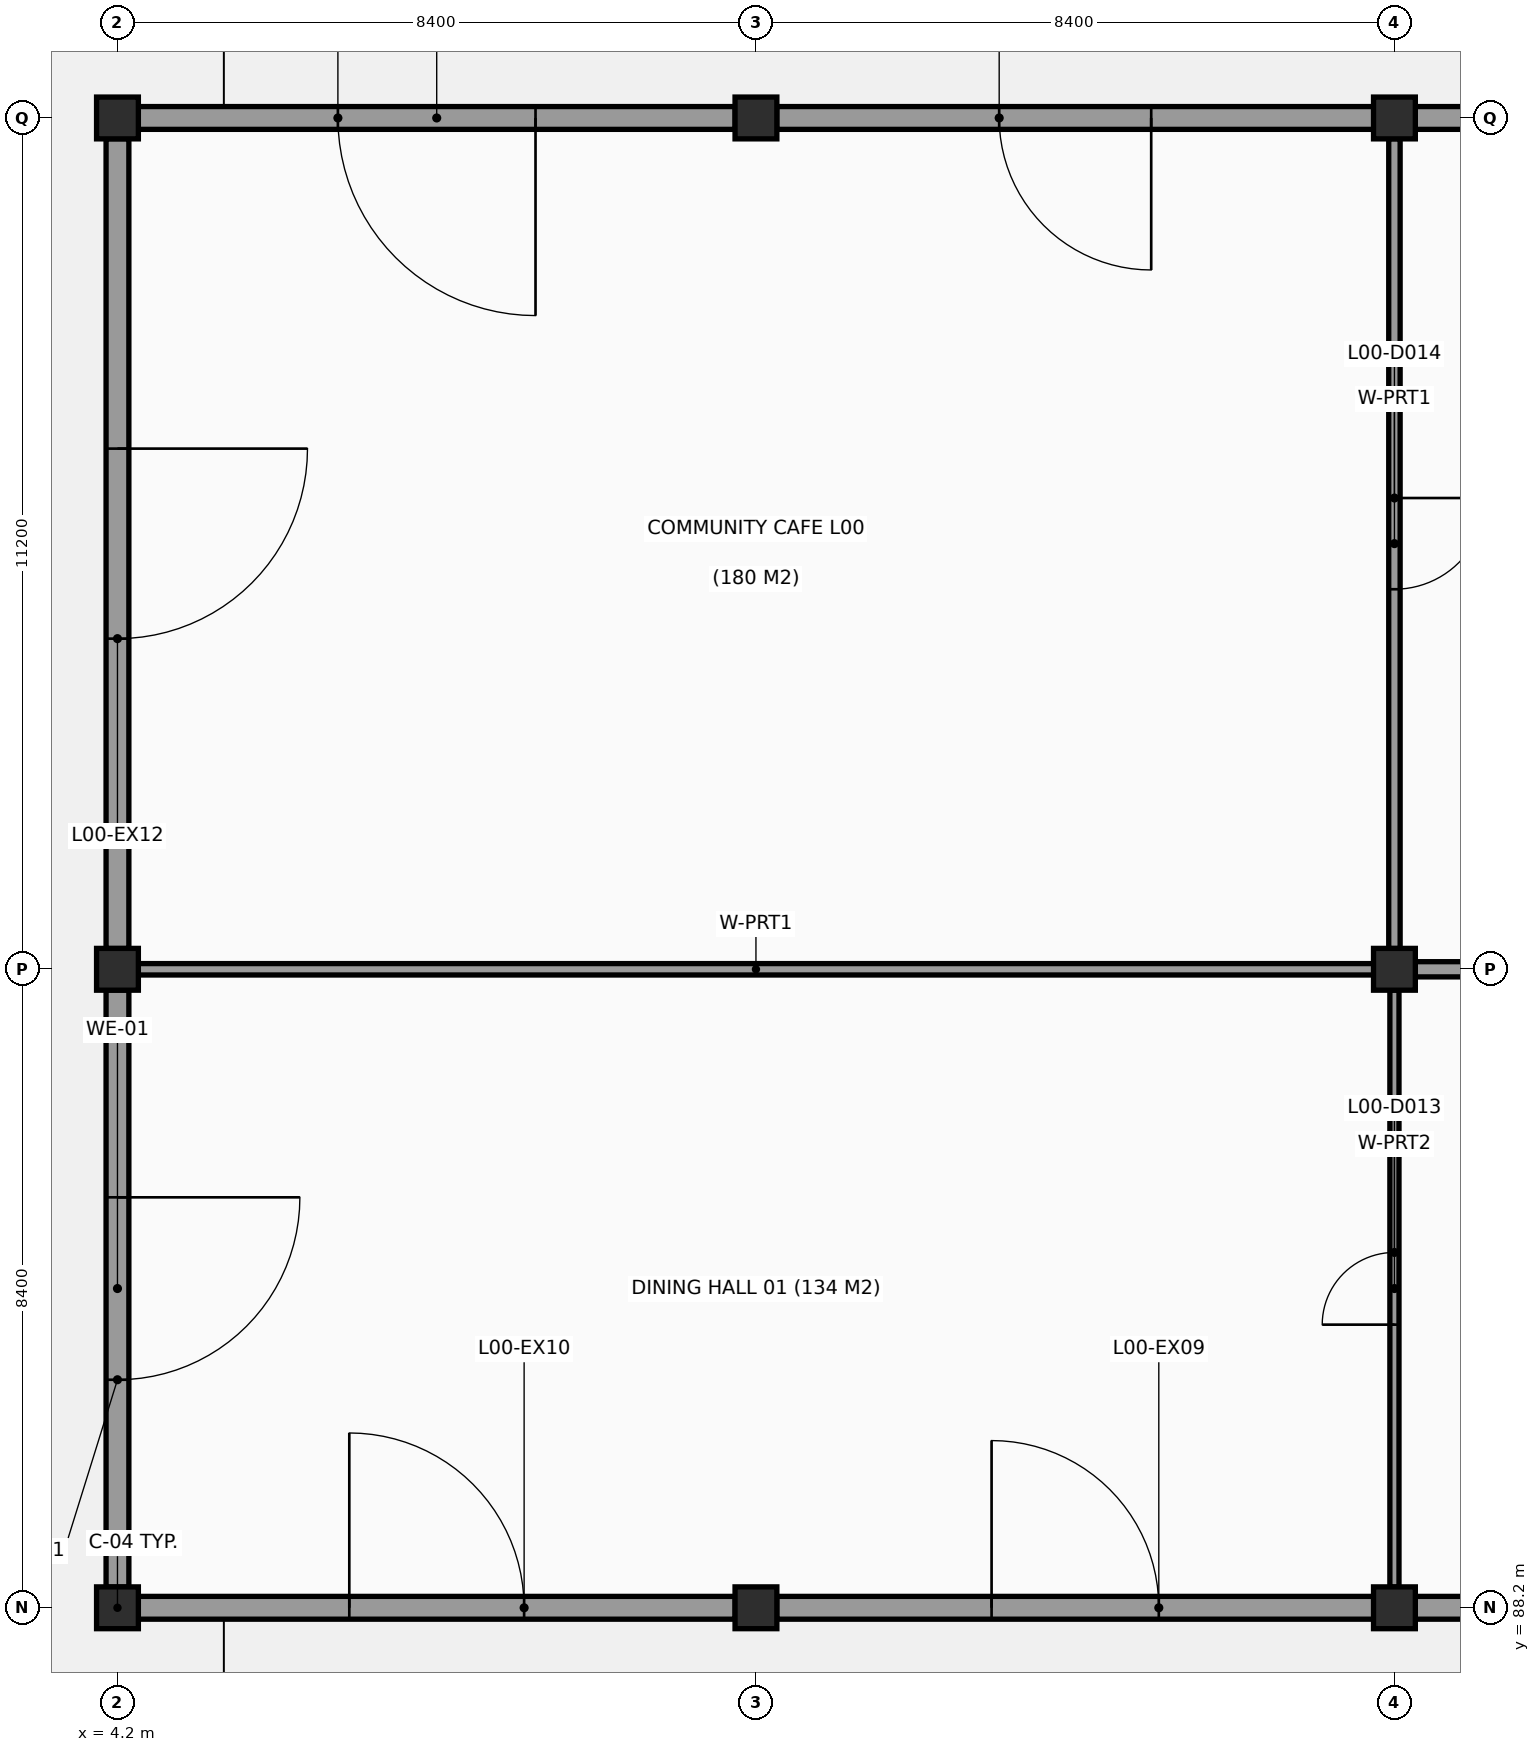
"""IFC4 building model, lengths in metres.
Left out: names, types, materials, properties, quantities, classifications, styles, units other than length and angle.
Written with IfcOpenShell. Run it as: python <this file> out.ifc"""

import sys

from ifc_helpers import new_model, si_unit, direction, frame, frame_2d, origin, origin_2d, place, context, subcontext, project, spatial, rectangle, extrude, element, fill, save


model = new_model("IFC4")
c1 = context("Model", 3, precision=1e-05, world=origin(), true_north=direction((0.0, 1.0)))
c2 = subcontext(c1, "Body", "Model", "MODEL_VIEW")
j1 = project(units=[si_unit("LENGTHUNIT", "METRE"), si_unit("PLANEANGLEUNIT", "RADIAN")], contexts=[c1])
p1 = place(None, origin())
s1 = spatial("IfcSite", under=j1, at=p1, CompositionType="ELEMENT")
p2 = place(p1, origin())
s2 = spatial("IfcBuilding", under=s1, at=p2, CompositionType="ELEMENT")
p3 = place(p2, origin())
s3 = spatial("IfcBuildingStorey", under=s2, at=p3, CompositionType="ELEMENT", Elevation=0.0)
for number, where, z_axis, x_axis in (
    (1, (4.2, 88.2, -0.4), (0.0, 0.0, 1.0), (1.0, 0.0, 0.0)),
    (2, (4.2, 96.6, -0.4), (0.0, 0.0, 1.0), (1.0, 0.0, 0.0)),
    (3, (4.2, 107.8, -0.4), (0.0, 0.0, 1.0), (1.0, 0.0, 0.0)),
    (4, (12.6, 88.2, -0.4), (0.0, 0.0, 1.0), (1.0, 0.0, 0.0)),
    (5, (12.6, 107.8, -0.4), (0.0, 0.0, 1.0), (1.0, 0.0, 0.0)),
    (6, (21.0, 88.2, -0.4), (0.0, 0.0, 1.0), (1.0, 0.0, 0.0)),
    (7, (21.0, 96.6, -0.4), (0.0, 0.0, 1.0), (1.0, 0.0, 0.0)),
    (8, (21.0, 107.8, -0.4), (0.0, 0.0, 1.0), (1.0, 0.0, 0.0)),
):
    element("IfcColumn", number, at=place(p3, frame(where, z_axis=z_axis, x_axis=x_axis)), inside=s3, PredefinedType="COLUMN", context=c2, shape_type="SweptSolid", body=[
        extrude(rectangle(XDim=0.55, YDim=0.55, at=origin_2d()), origin(), (0.0, 0.0, 1.0), 4.6),
    ])
p4 = place(p3, frame((29.152, 88.2, 0.0), z_axis=(0.0, 0.0, 1.0), x_axis=(-1.0, 0.0, 0.0)))
e9 = element("IfcWall", 9, at=p4, inside=s3, PredefinedType="SOLIDWALL", context=c2, shape_type="SweptSolid", body=[
    extrude(rectangle(XDim=7.879, YDim=0.3, at=frame_2d((3.939, 0.0))), origin(), (0.0, 0.0, 1.0), 3.22),
])
p5 = place(p4, frame((2.889, 0.0, 0.0)))
e10 = element("IfcOpeningElement", 10, at=p5, cuts=e9, PredefinedType="OPENING", context=c2, shape_type="SweptSolid", body=[
    extrude(rectangle(XDim=2.1, YDim=2.3, at=frame_2d((1.05, 1.15))), frame((0.0, 0.16, 0.0), z_axis=(0.0, -1.0, 0.0), x_axis=(1.0, 0.0, 0.0)), (0.0, 0.0, 1.0), 0.32),
])
p6 = place(p3, frame((20.727, 88.2, 0.0), z_axis=(0.0, 0.0, 1.0), x_axis=(-1.0, 0.0, 0.0)))
e11 = element("IfcWall", 11, at=p6, inside=s3, PredefinedType="SOLIDWALL", context=c2, shape_type="SweptSolid", body=[
    extrude(rectangle(XDim=7.854, YDim=0.3, at=frame_2d((3.927, 0.0))), origin(), (0.0, 0.0, 1.0), 3.22),
])
p7 = place(p6, frame((2.827, 0.0, 0.0)))
e12 = element("IfcOpeningElement", 12, at=p7, cuts=e11, PredefinedType="OPENING", context=c2, shape_type="SweptSolid", body=[
    extrude(rectangle(XDim=2.2, YDim=2.35, at=frame_2d((1.1, 1.175))), frame((0.0, 0.16, 0.0), z_axis=(0.0, -1.0, 0.0), x_axis=(1.0, 0.0, 0.0)), (0.0, 0.0, 1.0), 0.32),
])
p8 = place(p3, frame((12.327, 88.2, 0.0), z_axis=(0.0, 0.0, 1.0), x_axis=(-1.0, 0.0, 0.0)))
e13 = element("IfcWall", 13, at=p8, inside=s3, PredefinedType="SOLIDWALL", context=c2, shape_type="SweptSolid", body=[
    extrude(rectangle(XDim=7.854, YDim=0.3, at=frame_2d((3.927, 0.0))), origin(), (0.0, 0.0, 1.0), 3.22),
])
p9 = place(p8, frame((2.777, 0.0, 0.0)))
e14 = element("IfcOpeningElement", 14, at=p9, cuts=e13, PredefinedType="OPENING", context=c2, shape_type="SweptSolid", body=[
    extrude(rectangle(XDim=2.3, YDim=2.4, at=frame_2d((1.15, 1.2))), frame((0.0, 0.16, 0.0), z_axis=(0.0, -1.0, 0.0), x_axis=(1.0, 0.0, 0.0)), (0.0, 0.0, 1.0), 0.32),
])
p10 = place(p3, frame((4.2, 88.473, 0.0), z_axis=(0.0, 0.0, 1.0), x_axis=(0.0, 1.0, 0.0)))
e15 = element("IfcWall", 15, at=p10, inside=s3, PredefinedType="SOLIDWALL", context=c2, shape_type="SweptSolid", body=[
    extrude(rectangle(XDim=7.854, YDim=0.3, at=frame_2d((3.927, 0.0))), origin(), (0.0, 0.0, 1.0), 3.22),
])
p11 = place(p10, frame((2.727, 0.0, 0.0)))
e16 = element("IfcOpeningElement", 16, at=p11, cuts=e15, PredefinedType="OPENING", context=c2, shape_type="SweptSolid", body=[
    extrude(rectangle(XDim=2.4, YDim=2.45, at=frame_2d((1.2, 1.225))), frame((0.0, 0.16, 0.0), z_axis=(0.0, -1.0, 0.0), x_axis=(1.0, 0.0, 0.0)), (0.0, 0.0, 1.0), 0.32),
])
p12 = place(p3, frame((4.2, 96.873, 0.0), z_axis=(0.0, 0.0, 1.0), x_axis=(0.0, 1.0, 0.0)))
e17 = element("IfcWall", 17, at=p12, inside=s3, PredefinedType="SOLIDWALL", context=c2, shape_type="SweptSolid", body=[
    extrude(rectangle(XDim=10.654, YDim=0.3, at=frame_2d((5.327, 0.0))), origin(), (0.0, 0.0, 1.0), 3.22),
])
p13 = place(p12, frame((4.077, 0.0, 0.0)))
e18 = element("IfcOpeningElement", 18, at=p13, cuts=e17, PredefinedType="OPENING", context=c2, shape_type="SweptSolid", body=[
    extrude(rectangle(XDim=2.5, YDim=2.5, at=frame_2d((1.25, 1.25))), frame((0.0, 0.16, 0.0), z_axis=(0.0, -1.0, 0.0), x_axis=(1.0, 0.0, 0.0)), (0.0, 0.0, 1.0), 0.32),
])
p14 = place(p3, frame((4.473, 107.8, 0.0), z_axis=(0.0, 0.0, 1.0), x_axis=(1.0, 0.0, 0.0)))
e19 = element("IfcWall", 19, at=p14, inside=s3, PredefinedType="SOLIDWALL", context=c2, shape_type="SweptSolid", body=[
    extrude(rectangle(XDim=7.854, YDim=0.3, at=frame_2d((3.927, 0.0))), origin(), (0.0, 0.0, 1.0), 3.22),
])
p15 = place(p14, frame((2.627, 0.0, 0.0)))
e20 = element("IfcOpeningElement", 20, at=p15, cuts=e19, PredefinedType="OPENING", context=c2, shape_type="SweptSolid", body=[
    extrude(rectangle(XDim=2.6, YDim=2.55, at=frame_2d((1.3, 1.275))), frame((0.0, 0.16, 0.0), z_axis=(0.0, -1.0, 0.0), x_axis=(1.0, 0.0, 0.0)), (0.0, 0.0, 1.0), 0.32),
])
p16 = place(p3, frame((12.873, 107.8, 0.0), z_axis=(0.0, 0.0, 1.0), x_axis=(1.0, 0.0, 0.0)))
e21 = element("IfcWall", 21, at=p16, inside=s3, PredefinedType="SOLIDWALL", context=c2, shape_type="SweptSolid", body=[
    extrude(rectangle(XDim=7.854, YDim=0.3, at=frame_2d((3.927, 0.0))), origin(), (0.0, 0.0, 1.0), 3.22),
])
p17 = place(p16, frame((2.927, 0.0, 0.0)))
e22 = element("IfcOpeningElement", 22, at=p17, cuts=e21, PredefinedType="OPENING", context=c2, shape_type="SweptSolid", body=[
    extrude(rectangle(XDim=2.0, YDim=2.25, at=frame_2d((1.0, 1.125))), frame((0.0, 0.16, 0.0), z_axis=(0.0, -1.0, 0.0), x_axis=(1.0, 0.0, 0.0)), (0.0, 0.0, 1.0), 0.32),
])
p18 = place(p3, frame((21.273, 107.8, 0.0), z_axis=(0.0, 0.0, 1.0), x_axis=(1.0, 0.0, 0.0)))
e23 = element("IfcWall", 23, at=p18, inside=s3, PredefinedType="SOLIDWALL", context=c2, shape_type="SweptSolid", body=[
    extrude(rectangle(XDim=7.879, YDim=0.3, at=frame_2d((3.939, 0.0))), origin(), (0.0, 0.0, 1.0), 3.22),
])
p19 = place(p18, frame((2.889, 0.0, 0.0)))
e24 = element("IfcOpeningElement", 24, at=p19, cuts=e23, PredefinedType="OPENING", context=c2, shape_type="SweptSolid", body=[
    extrude(rectangle(XDim=2.1, YDim=2.3, at=frame_2d((1.05, 1.15))), frame((0.0, 0.16, 0.0), z_axis=(0.0, -1.0, 0.0), x_axis=(1.0, 0.0, 0.0)), (0.0, 0.0, 1.0), 0.32),
])
p20 = place(p3, frame((4.473, 96.6, 0.0), z_axis=(0.0, 0.0, 1.0), x_axis=(1.0, 0.0, 0.0)))
e25 = element("IfcWall", 25, at=p20, inside=s3, PredefinedType="PARTITIONING", context=c2, shape_type="SweptSolid", body=[
    extrude(rectangle(XDim=16.254, YDim=0.15, at=frame_2d((8.127, 0.0))), origin(), (0.0, 0.0, 1.0), 3.92),
])
p21 = place(p3, frame((21.0, 96.327, 0.0), z_axis=(0.0, 0.0, 1.0), x_axis=(0.0, -1.0, 0.0)))
e26 = element("IfcWall", 26, at=p21, inside=s3, PredefinedType="PARTITIONING", context=c2, shape_type="SweptSolid", body=[
    extrude(rectangle(XDim=7.854, YDim=0.12, at=frame_2d((3.927, 0.0))), origin(), (0.0, 0.0, 1.0), 3.22),
])
p22 = place(p21, frame((3.452, 0.0, 0.0)))
e27 = element("IfcOpeningElement", 27, at=p22, cuts=e26, PredefinedType="OPENING", context=c2, shape_type="SweptSolid", body=[
    extrude(rectangle(XDim=0.95, YDim=2.1, at=frame_2d((0.475, 1.05))), frame((0.0, 0.07, 0.0), z_axis=(0.0, -1.0, 0.0), x_axis=(1.0, 0.0, 0.0)), (0.0, 0.0, 1.0), 0.14),
])
p23 = place(p3, frame((21.0, 107.527, 0.0), z_axis=(0.0, 0.0, 1.0), x_axis=(0.0, -1.0, 0.0)))
e28 = element("IfcWall", 28, at=p23, inside=s3, PredefinedType="PARTITIONING", context=c2, shape_type="SweptSolid", body=[
    extrude(rectangle(XDim=10.654, YDim=0.15, at=frame_2d((5.327, 0.0))), origin(), (0.0, 0.0, 1.0), 3.22),
])
p24 = place(p23, frame((4.727, 0.0, 0.0)))
e29 = element("IfcOpeningElement", 29, at=p24, cuts=e28, PredefinedType="OPENING", context=c2, shape_type="SweptSolid", body=[
    extrude(rectangle(XDim=1.2, YDim=2.15, at=frame_2d((0.6, 1.075))), frame((0.0, 0.085, 0.0), z_axis=(0.0, -1.0, 0.0), x_axis=(1.0, 0.0, 0.0)), (0.0, 0.0, 1.0), 0.17),
])
p25 = place(p3, frame((37.527, 96.6, 0.0), z_axis=(0.0, 0.0, 1.0), x_axis=(-1.0, 0.0, 0.0)))
e30 = element("IfcWall", 30, at=p25, inside=s3, PredefinedType="PARTITIONING", context=c2, shape_type="SweptSolid", body=[
    extrude(rectangle(XDim=16.254, YDim=0.2, at=frame_2d((8.127, 0.0))), origin(), (0.0, 0.0, 1.0), 3.53),
])
p26 = place(p25, frame((9.202, 0.0, 0.0)))
e31 = element("IfcOpeningElement", 31, at=p26, cuts=e30, PredefinedType="OPENING", context=c2, shape_type="SweptSolid", body=[
    extrude(rectangle(XDim=1.55, YDim=2.2, at=frame_2d((0.775, 1.1))), frame((0.0, 0.11, 0.0), z_axis=(0.0, -1.0, 0.0), x_axis=(1.0, 0.0, 0.0)), (0.0, 0.0, 1.0), 0.22),
])
p27 = place(p7, origin())
e32 = element("IfcDoor", 32, at=p27, inside=s3, OperationType="DOUBLE_DOOR_SINGLE_SWING", PredefinedType="DOOR", context=c2, shape_type="SweptSolid", body=[
    extrude(rectangle(XDim=2.2, YDim=2.35, at=frame_2d((1.1, 1.175))), frame((0.0, 0.025, 0.0), z_axis=(0.0, -1.0, 0.0), x_axis=(1.0, 0.0, 0.0)), (0.0, 0.0, 1.0), 0.05),
])
fill(e12, e32)
p28 = place(p9, origin())
e33 = element("IfcDoor", 33, at=p28, inside=s3, OperationType="DOUBLE_DOOR_SINGLE_SWING", PredefinedType="DOOR", context=c2, shape_type="SweptSolid", body=[
    extrude(rectangle(XDim=2.3, YDim=2.4, at=frame_2d((1.15, 1.2))), frame((0.0, 0.025, 0.0), z_axis=(0.0, -1.0, 0.0), x_axis=(1.0, 0.0, 0.0)), (0.0, 0.0, 1.0), 0.05),
])
fill(e14, e33)
p29 = place(p11, origin())
e34 = element("IfcDoor", 34, at=p29, inside=s3, OperationType="DOUBLE_DOOR_SINGLE_SWING", PredefinedType="DOOR", context=c2, shape_type="SweptSolid", body=[
    extrude(rectangle(XDim=2.4, YDim=2.45, at=frame_2d((1.2, 1.225))), frame((0.0, 0.025, 0.0), z_axis=(0.0, -1.0, 0.0), x_axis=(1.0, 0.0, 0.0)), (0.0, 0.0, 1.0), 0.05),
])
fill(e16, e34)
p30 = place(p13, origin())
e35 = element("IfcDoor", 35, at=p30, inside=s3, OperationType="DOUBLE_DOOR_SINGLE_SWING", PredefinedType="DOOR", context=c2, shape_type="SweptSolid", body=[
    extrude(rectangle(XDim=2.5, YDim=2.5, at=frame_2d((1.25, 1.25))), frame((0.0, 0.025, 0.0), z_axis=(0.0, -1.0, 0.0), x_axis=(1.0, 0.0, 0.0)), (0.0, 0.0, 1.0), 0.05),
])
fill(e18, e35)
p31 = place(p15, origin())
e36 = element("IfcDoor", 36, at=p31, inside=s3, OperationType="DOUBLE_DOOR_SINGLE_SWING", PredefinedType="DOOR", context=c2, shape_type="SweptSolid", body=[
    extrude(rectangle(XDim=2.6, YDim=2.55, at=frame_2d((1.3, 1.275))), frame((0.0, 0.025, 0.0), z_axis=(0.0, -1.0, 0.0), x_axis=(1.0, 0.0, 0.0)), (0.0, 0.0, 1.0), 0.05),
])
fill(e20, e36)
p32 = place(p17, origin())
e37 = element("IfcDoor", 37, at=p32, inside=s3, OperationType="DOUBLE_DOOR_SINGLE_SWING", PredefinedType="DOOR", context=c2, shape_type="SweptSolid", body=[
    extrude(rectangle(XDim=2.0, YDim=2.25, at=frame_2d((1.0, 1.125))), frame((0.0, 0.025, 0.0), z_axis=(0.0, -1.0, 0.0), x_axis=(1.0, 0.0, 0.0)), (0.0, 0.0, 1.0), 0.05),
])
fill(e22, e37)
p33 = place(p22, origin())
e38 = element("IfcDoor", 38, at=p33, inside=s3, OperationType="SINGLE_SWING_RIGHT", PredefinedType="DOOR", context=c2, shape_type="SweptSolid", body=[
    extrude(rectangle(XDim=0.95, YDim=2.1, at=frame_2d((0.475, 1.05))), frame((0.0, 0.025, 0.0), z_axis=(0.0, -1.0, 0.0), x_axis=(1.0, 0.0, 0.0)), (0.0, 0.0, 1.0), 0.05),
])
fill(e27, e38)
p34 = place(p24, origin())
e39 = element("IfcDoor", 39, at=p34, inside=s3, OperationType="SINGLE_SWING_LEFT", PredefinedType="DOOR", context=c2, shape_type="SweptSolid", body=[
    extrude(rectangle(XDim=1.2, YDim=2.15, at=frame_2d((0.6, 1.075))), frame((0.0, 0.025, 0.0), z_axis=(0.0, -1.0, 0.0), x_axis=(1.0, 0.0, 0.0)), (0.0, 0.0, 1.0), 0.05),
])
fill(e29, e39)
save(model, sys.argv[1])
